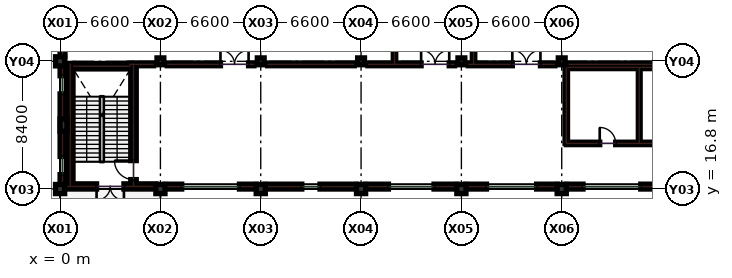
"""IFC4 building model, lengths in metres.
Left out: names, types, materials, properties, quantities, classifications, styles, units other than length and angle.
Written with IfcOpenShell. Run it as: python <this file> out.ifc"""

import sys

from ifc_helpers import new_model, si_unit, direction, frame, frame_2d, origin, origin_2d, place, context, subcontext, project, spatial, rectangle, extrude, element, fill, save


model = new_model("IFC4")
c1 = context("Model", 3, precision=1e-05, world=origin(), true_north=direction((0.0, 1.0)))
c2 = subcontext(c1, "Body", "Model", "MODEL_VIEW")
j1 = project(units=[si_unit("LENGTHUNIT", "METRE"), si_unit("PLANEANGLEUNIT", "RADIAN")], contexts=[c1])
p1 = place(None, origin())
s1 = spatial("IfcSite", under=j1, at=p1, CompositionType="ELEMENT")
p2 = place(p1, origin())
s2 = spatial("IfcBuilding", under=s1, at=p2, CompositionType="ELEMENT")
p3 = place(p2, origin())
s3 = spatial("IfcBuildingStorey", under=s2, at=p3, CompositionType="ELEMENT", Elevation=0.0)
for number, where, z_axis, x_axis in (
    (1, (0.0, 16.8, 0.0), (0.0, 0.0, 1.0), (1.0, 0.0, 0.0)),
    (2, (0.0, 25.2, 0.0), (0.0, 0.0, 1.0), (1.0, 0.0, 0.0)),
    (3, (6.6, 16.8, 0.0), (0.0, 0.0, 1.0), (1.0, 0.0, 0.0)),
):
    element("IfcColumn", number, at=place(p3, frame(where, z_axis=z_axis, x_axis=x_axis)), inside=s3, PredefinedType="COLUMN", context=c2, shape_type="SweptSolid", body=[
        extrude(rectangle(XDim=0.6, YDim=0.6, at=origin_2d()), origin(), (0.0, 0.0, 1.0), 5.4),
    ])
p4 = place(p3, frame((6.6, 25.2, 0.0), z_axis=(0.0, 0.0, 1.0), x_axis=(1.0, 0.0, 0.0)))
e4 = element("IfcColumn", 4, at=p4, inside=s3, PredefinedType="COLUMN", context=c2, shape_type="SweptSolid", body=[
    extrude(rectangle(XDim=0.45, YDim=0.45, at=origin_2d()), origin(), (0.0, 0.0, 1.0), 5.4),
])
p5 = place(p3, frame((13.2, 16.8, 0.0), z_axis=(0.0, 0.0, 1.0), x_axis=(1.0, 0.0, 0.0)))
e5 = element("IfcColumn", 5, at=p5, inside=s3, PredefinedType="COLUMN", context=c2, shape_type="SweptSolid", body=[
    extrude(rectangle(XDim=0.6, YDim=0.6, at=origin_2d()), origin(), (0.0, 0.0, 1.0), 5.4),
])
p6 = place(p3, frame((13.2, 25.2, 0.0), z_axis=(0.0, 0.0, 1.0), x_axis=(1.0, 0.0, 0.0)))
e6 = element("IfcColumn", 6, at=p6, inside=s3, PredefinedType="COLUMN", context=c2, shape_type="SweptSolid", body=[
    extrude(rectangle(XDim=0.45, YDim=0.45, at=origin_2d()), origin(), (0.0, 0.0, 1.0), 5.4),
])
p7 = place(p3, frame((19.8, 16.8, 0.0), z_axis=(0.0, 0.0, 1.0), x_axis=(1.0, 0.0, 0.0)))
e7 = element("IfcColumn", 7, at=p7, inside=s3, PredefinedType="COLUMN", context=c2, shape_type="SweptSolid", body=[
    extrude(rectangle(XDim=0.6, YDim=0.6, at=origin_2d()), origin(), (0.0, 0.0, 1.0), 5.4),
])
p8 = place(p3, frame((19.8, 25.2, 0.0), z_axis=(0.0, 0.0, 1.0), x_axis=(1.0, 0.0, 0.0)))
e8 = element("IfcColumn", 8, at=p8, inside=s3, PredefinedType="COLUMN", context=c2, shape_type="SweptSolid", body=[
    extrude(rectangle(XDim=0.45, YDim=0.45, at=origin_2d()), origin(), (0.0, 0.0, 1.0), 5.4),
])
p9 = place(p3, frame((26.4, 16.8, 0.0), z_axis=(0.0, 0.0, 1.0), x_axis=(1.0, 0.0, 0.0)))
e9 = element("IfcColumn", 9, at=p9, inside=s3, PredefinedType="COLUMN", context=c2, shape_type="SweptSolid", body=[
    extrude(rectangle(XDim=0.6, YDim=0.6, at=origin_2d()), origin(), (0.0, 0.0, 1.0), 5.4),
])
p10 = place(p3, frame((26.4, 25.2, 0.0), z_axis=(0.0, 0.0, 1.0), x_axis=(1.0, 0.0, 0.0)))
e10 = element("IfcColumn", 10, at=p10, inside=s3, PredefinedType="COLUMN", context=c2, shape_type="SweptSolid", body=[
    extrude(rectangle(XDim=0.45, YDim=0.45, at=origin_2d()), origin(), (0.0, 0.0, 1.0), 5.4),
])
p11 = place(p3, frame((33.0, 16.8, 0.0), z_axis=(0.0, 0.0, 1.0), x_axis=(1.0, 0.0, 0.0)))
e11 = element("IfcColumn", 11, at=p11, inside=s3, PredefinedType="COLUMN", context=c2, shape_type="SweptSolid", body=[
    extrude(rectangle(XDim=0.6, YDim=0.6, at=origin_2d()), origin(), (0.0, 0.0, 1.0), 5.4),
])
p12 = place(p3, frame((33.0, 25.2, 0.0), z_axis=(0.0, 0.0, 1.0), x_axis=(1.0, 0.0, 0.0)))
e12 = element("IfcColumn", 12, at=p12, inside=s3, PredefinedType="COLUMN", context=c2, shape_type="SweptSolid", body=[
    extrude(rectangle(XDim=0.45, YDim=0.45, at=origin_2d()), origin(), (0.0, 0.0, 1.0), 5.4),
])
p13 = place(p3, frame((0.225, 21.0, 0.0), z_axis=(0.0, 0.0, 1.0), x_axis=(1.0, 0.0, 0.0)))
e13 = element("IfcColumn", 13, at=p13, inside=s3, PredefinedType="PILASTER", context=c2, shape_type="SweptSolid", body=[
    extrude(rectangle(XDim=0.45, YDim=0.8, at=origin_2d()), origin(), (0.0, 0.0, 1.0), 5.4),
])
p14 = place(p3, frame((33.3, 19.8, 0.0), z_axis=(0.0, 0.0, 1.0), x_axis=(1.0, 0.0, 0.0)))
e14 = element("IfcWall", 14, at=p14, inside=s3, PredefinedType="PARTITIONING", context=c2, shape_type="SweptSolid", body=[
    extrude(rectangle(XDim=12.65, YDim=0.16, at=frame_2d((6.325, 0.0))), origin(), (0.0, 0.0, 1.0), 4.25),
])
p15 = place(p14, frame((2.2, 0.0, 0.0)))
e15 = element("IfcOpeningElement", 15, at=p15, cuts=e14, PredefinedType="OPENING", context=c2, shape_type="SweptSolid", body=[
    extrude(rectangle(XDim=1.05, YDim=2.15, at=frame_2d((0.525, 1.075))), frame((0.0, 0.09, 0.0), z_axis=(0.0, -1.0, 0.0), x_axis=(1.0, 0.0, 0.0)), (0.0, 0.0, 1.0), 0.18),
])
p16 = place(p14, frame((7.0, 0.0, 0.0)))
e16 = element("IfcOpeningElement", 16, at=p16, cuts=e14, PredefinedType="OPENING", context=c2, shape_type="SweptSolid", body=[
    extrude(rectangle(XDim=1.05, YDim=2.15, at=frame_2d((0.525, 1.075))), frame((0.0, 0.09, 0.0), z_axis=(0.0, -1.0, 0.0), x_axis=(1.0, 0.0, 0.0)), (0.0, 0.0, 1.0), 0.18),
])
p17 = place(p14, frame((11.1, 0.0, 0.0)))
e17 = element("IfcOpeningElement", 17, at=p17, cuts=e14, PredefinedType="OPENING", context=c2, shape_type="SweptSolid", body=[
    extrude(rectangle(XDim=1.05, YDim=2.15, at=frame_2d((0.525, 1.075))), frame((0.0, 0.09, 0.0), z_axis=(0.0, -1.0, 0.0), x_axis=(1.0, 0.0, 0.0)), (0.0, 0.0, 1.0), 0.18),
])
p18 = place(p3, frame((33.3, 24.8, 0.0), z_axis=(0.0, 0.0, 1.0), x_axis=(1.0, 0.0, 0.0)))
e18 = element("IfcWall", 18, at=p18, inside=s3, PredefinedType="PARTITIONING", context=c2, shape_type="SweptSolid", body=[
    extrude(rectangle(XDim=5.85, YDim=0.16, at=frame_2d((2.925, 0.0))), origin(), (0.0, 0.0, 1.0), 4.25),
])
p19 = place(p3, frame((33.3, 19.8, 0.0), z_axis=(0.0, 0.0, 1.0), x_axis=(0.0, 1.0, 0.0)))
e19 = element("IfcWall", 19, at=p19, inside=s3, PredefinedType="PARTITIONING", context=c2, shape_type="SweptSolid", body=[
    extrude(rectangle(XDim=5.0, YDim=0.16, at=frame_2d((2.5, 0.0))), origin(), (0.0, 0.0, 1.0), 4.25),
])
p20 = place(p3, frame((38.1, 19.8, 0.0), z_axis=(0.0, 0.0, 1.0), x_axis=(0.0, 1.0, 0.0)))
e20 = element("IfcWall", 20, at=p20, inside=s3, PredefinedType="PARTITIONING", context=c2, shape_type="SweptSolid", body=[
    extrude(rectangle(XDim=5.0, YDim=0.12, at=frame_2d((2.5, 0.0))), origin(), (0.0, 0.0, 1.0), 4.25),
])
p21 = place(p3, frame((4.55, 25.0, 0.0), z_axis=(0.0, 0.0, 1.0), x_axis=(1.0, 0.0, 0.0)))
e21 = element("IfcWall", 21, at=p21, inside=s3, PredefinedType="SOLIDWALL", context=c2, shape_type="SweptSolid", body=[
    extrude(rectangle(XDim=1.6, YDim=0.18, at=frame_2d((0.8, 0.0))), origin(), (0.0, 0.0, 1.0), 4.235),
])
p22 = place(p3, frame((7.05, 25.0, 0.0), z_axis=(0.0, 0.0, 1.0), x_axis=(1.0, 0.0, 0.0)))
e22 = element("IfcWall", 22, at=p22, inside=s3, PredefinedType="SOLIDWALL", context=c2, shape_type="SweptSolid", body=[
    extrude(rectangle(XDim=5.7, YDim=0.18, at=frame_2d((2.85, 0.0))), origin(), (0.0, 0.0, 1.0), 4.235),
])
p23 = place(p22, frame((3.5, 0.0, 0.0)))
e23 = element("IfcOpeningElement", 23, at=p23, cuts=e22, PredefinedType="OPENING", context=c2, shape_type="SweptSolid", body=[
    extrude(rectangle(XDim=1.85, YDim=2.25, at=frame_2d((0.925, 1.125))), frame((0.0, 0.1, 0.0), z_axis=(0.0, -1.0, 0.0), x_axis=(1.0, 0.0, 0.0)), (0.0, 0.0, 1.0), 0.2),
])
p24 = place(p3, frame((13.65, 25.0, 0.0), z_axis=(0.0, 0.0, 1.0), x_axis=(1.0, 0.0, 0.0)))
e24 = element("IfcWall", 24, at=p24, inside=s3, PredefinedType="SOLIDWALL", context=c2, shape_type="SweptSolid", body=[
    extrude(rectangle(XDim=5.7, YDim=0.18, at=frame_2d((2.85, 0.0))), origin(), (0.0, 0.0, 1.0), 4.235),
])
p25 = place(p3, frame((20.25, 25.0, 0.0), z_axis=(0.0, 0.0, 1.0), x_axis=(1.0, 0.0, 0.0)))
e25 = element("IfcWall", 25, at=p25, inside=s3, PredefinedType="SOLIDWALL", context=c2, shape_type="SweptSolid", body=[
    extrude(rectangle(XDim=5.7, YDim=0.18, at=frame_2d((2.85, 0.0))), origin(), (0.0, 0.0, 1.0), 4.235),
])
p26 = place(p25, frame((3.5, 0.0, 0.0)))
e26 = element("IfcOpeningElement", 26, at=p26, cuts=e25, PredefinedType="OPENING", context=c2, shape_type="SweptSolid", body=[
    extrude(rectangle(XDim=1.85, YDim=2.25, at=frame_2d((0.925, 1.125))), frame((0.0, 0.1, 0.0), z_axis=(0.0, -1.0, 0.0), x_axis=(1.0, 0.0, 0.0)), (0.0, 0.0, 1.0), 0.2),
])
p27 = place(p3, frame((26.85, 25.0, 0.0), z_axis=(0.0, 0.0, 1.0), x_axis=(1.0, 0.0, 0.0)))
e27 = element("IfcWall", 27, at=p27, inside=s3, PredefinedType="SOLIDWALL", context=c2, shape_type="SweptSolid", body=[
    extrude(rectangle(XDim=5.7, YDim=0.18, at=frame_2d((2.85, 0.0))), origin(), (0.0, 0.0, 1.0), 4.235),
])
p28 = place(p27, frame((2.9, 0.0, 0.0)))
e28 = element("IfcOpeningElement", 28, at=p28, cuts=e27, PredefinedType="OPENING", context=c2, shape_type="SweptSolid", body=[
    extrude(rectangle(XDim=1.85, YDim=2.25, at=frame_2d((0.925, 1.125))), frame((0.0, 0.1, 0.0), z_axis=(0.0, -1.0, 0.0), x_axis=(1.0, 0.0, 0.0)), (0.0, 0.0, 1.0), 0.2),
])
p29 = place(p3, frame((33.45, 25.0, 0.0), z_axis=(0.0, 0.0, 1.0), x_axis=(1.0, 0.0, 0.0)))
e29 = element("IfcWall", 29, at=p29, inside=s3, PredefinedType="SOLIDWALL", context=c2, shape_type="SweptSolid", body=[
    extrude(rectangle(XDim=5.7, YDim=0.18, at=frame_2d((2.85, 0.0))), origin(), (0.0, 0.0, 1.0), 4.235),
])
for number, where, z_axis, x_axis in (
    (30, (22.0, 25.0, 0.0), (0.0, 0.0, 1.0), (0.0, 1.0, 0.0)),
    (31, (27.2, 25.0, 0.0), (0.0, 0.0, 1.0), (0.0, 1.0, 0.0)),
):
    element("IfcWall", number, at=place(p3, frame(where, z_axis=z_axis, x_axis=x_axis)), inside=s3, PredefinedType="PARTITIONING", context=c2, shape_type="SweptSolid", body=[
        extrude(rectangle(XDim=25.2, YDim=0.16, at=frame_2d((12.6, 0.0))), origin(), (0.0, 0.0, 1.0), 4.25),
    ])
p30 = place(p3, frame((0.295, 16.97, 0.0), z_axis=(0.0, 0.0, 1.0), x_axis=(1.0, 0.0, 0.0)))
e32 = element("IfcWall", 32, at=p30, inside=s3, PredefinedType="SHEAR", context=c2, shape_type="SweptSolid", body=[
    extrude(rectangle(XDim=6.01, YDim=0.34, at=frame_2d((3.005, 0.0))), origin(), (0.0, 0.0, 1.0), 5.1),
])
p31 = place(p30, frame((2.105, 0.0, 0.0)))
e33 = element("IfcOpeningElement", 33, at=p31, cuts=e32, PredefinedType="OPENING", context=c2, shape_type="SweptSolid", body=[
    extrude(rectangle(XDim=1.8, YDim=2.2, at=frame_2d((0.9, 1.1))), frame((0.0, 0.18, 0.0), z_axis=(0.0, -1.0, 0.0), x_axis=(1.0, 0.0, 0.0)), (0.0, 0.0, 1.0), 0.36),
])
p32 = place(p3, frame((0.16, 24.905, 0.0), z_axis=(0.0, 0.0, 1.0), x_axis=(0.0, -1.0, 0.0)))
e34 = element("IfcWall", 34, at=p32, inside=s3, PredefinedType="SOLIDWALL", context=c2, shape_type="SweptSolid", body=[
    extrude(rectangle(XDim=7.81, YDim=0.32, at=frame_2d((3.905, 0.0))), origin(), (0.0, 0.0, 1.0), 4.335),
])
p33 = place(p32, frame((0.65, 0.0, 0.95)))
e35 = element("IfcOpeningElement", 35, at=p33, cuts=e34, PredefinedType="OPENING", context=c2, shape_type="SweptSolid", body=[
    extrude(rectangle(XDim=1.2, YDim=1.5, at=frame_2d((0.6, 0.75))), frame((0.0, 0.17, 0.0), z_axis=(0.0, -1.0, 0.0), x_axis=(1.0, 0.0, 0.0)), (0.0, 0.0, 1.0), 0.34),
])
p34 = place(p32, frame((5.96, 0.0, 0.95)))
e36 = element("IfcOpeningElement", 36, at=p34, cuts=e34, PredefinedType="OPENING", context=c2, shape_type="SweptSolid", body=[
    extrude(rectangle(XDim=1.2, YDim=1.5, at=frame_2d((0.6, 0.75))), frame((0.0, 0.17, 0.0), z_axis=(0.0, -1.0, 0.0), x_axis=(1.0, 0.0, 0.0)), (0.0, 0.0, 1.0), 0.34),
])
p35 = place(p3, frame((0.16, 33.305, 0.0), z_axis=(0.0, 0.0, 1.0), x_axis=(0.0, -1.0, 0.0)))
e37 = element("IfcWall", 37, at=p35, inside=s3, PredefinedType="SOLIDWALL", context=c2, shape_type="SweptSolid", body=[
    extrude(rectangle(XDim=7.81, YDim=0.32, at=frame_2d((3.905, 0.0))), origin(), (0.0, 0.0, 1.0), 4.335),
])
p36 = place(p35, frame((3.005, 0.0, 0.0)))
e38 = element("IfcOpeningElement", 38, at=p36, cuts=e37, PredefinedType="OPENING", context=c2, shape_type="SweptSolid", body=[
    extrude(rectangle(XDim=1.8, YDim=2.2, at=frame_2d((0.9, 1.1))), frame((0.0, 0.17, 0.0), z_axis=(0.0, -1.0, 0.0), x_axis=(1.0, 0.0, 0.0)), (0.0, 0.0, 1.0), 0.34),
])
p37 = place(p3, frame((6.895, 16.96, 0.0), z_axis=(0.0, 0.0, 1.0), x_axis=(1.0, 0.0, 0.0)))
e39 = element("IfcWall", 39, at=p37, inside=s3, PredefinedType="SOLIDWALL", context=c2, shape_type="SweptSolid", body=[
    extrude(rectangle(XDim=6.01, YDim=0.32, at=frame_2d((3.005, 0.0))), origin(), (0.0, 0.0, 1.0), 4.385),
])
p38 = place(p37, frame((1.105, 0.0, 1.35)))
e40 = element("IfcOpeningElement", 40, at=p38, cuts=e39, PredefinedType="OPENING", context=c2, shape_type="SweptSolid", body=[
    extrude(rectangle(XDim=3.8, YDim=1.15, at=frame_2d((1.9, 0.575))), frame((0.0, 0.17, 0.0), z_axis=(0.0, -1.0, 0.0), x_axis=(1.0, 0.0, 0.0)), (0.0, 0.0, 1.0), 0.34),
])
p39 = place(p3, frame((13.495, 16.96, 0.0), z_axis=(0.0, 0.0, 1.0), x_axis=(1.0, 0.0, 0.0)))
e41 = element("IfcWall", 41, at=p39, inside=s3, PredefinedType="SOLIDWALL", context=c2, shape_type="SweptSolid", body=[
    extrude(rectangle(XDim=6.01, YDim=0.32, at=frame_2d((3.005, 0.0))), origin(), (0.0, 0.0, 1.0), 4.385),
])
p40 = place(p39, frame((2.405, 0.0, 0.95)))
e42 = element("IfcOpeningElement", 42, at=p40, cuts=e41, PredefinedType="OPENING", context=c2, shape_type="SweptSolid", body=[
    extrude(rectangle(XDim=1.2, YDim=1.5, at=frame_2d((0.6, 0.75))), frame((0.0, 0.17, 0.0), z_axis=(0.0, -1.0, 0.0), x_axis=(1.0, 0.0, 0.0)), (0.0, 0.0, 1.0), 0.34),
])
p41 = place(p3, frame((20.095, 16.96, 0.0), z_axis=(0.0, 0.0, 1.0), x_axis=(1.0, 0.0, 0.0)))
e43 = element("IfcWall", 43, at=p41, inside=s3, PredefinedType="SOLIDWALL", context=c2, shape_type="SweptSolid", body=[
    extrude(rectangle(XDim=6.01, YDim=0.32, at=frame_2d((3.005, 0.0))), origin(), (0.0, 0.0, 1.0), 4.385),
])
p42 = place(p41, frame((1.505, 0.0, 0.95)))
e44 = element("IfcOpeningElement", 44, at=p42, cuts=e43, PredefinedType="OPENING", context=c2, shape_type="SweptSolid", body=[
    extrude(rectangle(XDim=3.0, YDim=1.8, at=frame_2d((1.5, 0.9))), frame((0.0, 0.17, 0.0), z_axis=(0.0, -1.0, 0.0), x_axis=(1.0, 0.0, 0.0)), (0.0, 0.0, 1.0), 0.34),
])
p43 = place(p3, frame((26.695, 16.96, 0.0), z_axis=(0.0, 0.0, 1.0), x_axis=(1.0, 0.0, 0.0)))
e45 = element("IfcWall", 45, at=p43, inside=s3, PredefinedType="SOLIDWALL", context=c2, shape_type="SweptSolid", body=[
    extrude(rectangle(XDim=6.01, YDim=0.32, at=frame_2d((3.005, 0.0))), origin(), (0.0, 0.0, 1.0), 4.385),
])
p44 = place(p43, frame((1.355, 0.0, 1.35)))
e46 = element("IfcOpeningElement", 46, at=p44, cuts=e45, PredefinedType="OPENING", context=c2, shape_type="SweptSolid", body=[
    extrude(rectangle(XDim=3.3, YDim=1.05, at=frame_2d((1.65, 0.525))), frame((0.0, 0.17, 0.0), z_axis=(0.0, -1.0, 0.0), x_axis=(1.0, 0.0, 0.0)), (0.0, 0.0, 1.0), 0.34),
])
p45 = place(p3, frame((33.295, 16.96, 0.0), z_axis=(0.0, 0.0, 1.0), x_axis=(1.0, 0.0, 0.0)))
e47 = element("IfcWall", 47, at=p45, inside=s3, PredefinedType="SOLIDWALL", context=c2, shape_type="SweptSolid", body=[
    extrude(rectangle(XDim=6.01, YDim=0.32, at=frame_2d((3.005, 0.0))), origin(), (0.0, 0.0, 1.0), 4.385),
])
p46 = place(p45, frame((1.105, 0.0, 1.35)))
e48 = element("IfcOpeningElement", 48, at=p46, cuts=e47, PredefinedType="OPENING", context=c2, shape_type="SweptSolid", body=[
    extrude(rectangle(XDim=3.8, YDim=1.15, at=frame_2d((1.9, 0.575))), frame((0.0, 0.17, 0.0), z_axis=(0.0, -1.0, 0.0), x_axis=(1.0, 0.0, 0.0)), (0.0, 0.0, 1.0), 0.34),
])
p47 = place(p3, frame((0.67, 16.97, 0.0), z_axis=(0.0, 0.0, 1.0), x_axis=(0.0, 1.0, 0.0)))
e49 = element("IfcWall", 49, at=p47, inside=s3, PredefinedType="SHEAR", context=c2, shape_type="SweptSolid", body=[
    extrude(rectangle(XDim=8.09, YDim=0.36, at=frame_2d((4.045, 0.0))), origin(), (0.0, 0.0, 1.0), 5.1),
])
p48 = place(p3, frame((4.83, 16.97, 0.0), z_axis=(0.0, 0.0, 1.0), x_axis=(0.0, 1.0, 0.0)))
e50 = element("IfcWall", 50, at=p48, inside=s3, PredefinedType="SHEAR", context=c2, shape_type="SweptSolid", body=[
    extrude(rectangle(XDim=8.09, YDim=0.36, at=frame_2d((4.045, 0.0))), origin(), (0.0, 0.0, 1.0), 5.1),
])
p49 = place(p48, frame((0.45, 0.0, 0.0)))
e51 = element("IfcOpeningElement", 51, at=p49, cuts=e50, PredefinedType="OPENING", context=c2, shape_type="SweptSolid", body=[
    extrude(rectangle(XDim=1.25, YDim=2.15, at=frame_2d((0.625, 1.075))), frame((0.0, 0.19, 0.0), z_axis=(0.0, -1.0, 0.0), x_axis=(1.0, 0.0, 0.0)), (0.0, 0.0, 1.0), 0.38),
])
p50 = place(p3, frame((0.85, 24.88, 0.0), z_axis=(0.0, 0.0, 1.0), x_axis=(1.0, 0.0, 0.0)))
e52 = element("IfcWall", 52, at=p50, inside=s3, PredefinedType="SHEAR", context=c2, shape_type="SweptSolid", body=[
    extrude(rectangle(XDim=3.8, YDim=0.36, at=frame_2d((1.9, 0.0))), origin(), (0.0, 0.0, 1.0), 5.1),
])
p51 = place(p15, origin())
e53 = element("IfcDoor", 53, at=p51, inside=s3, OperationType="SINGLE_SWING_LEFT", PredefinedType="DOOR", context=c2, shape_type="SweptSolid", body=[
    extrude(rectangle(XDim=1.05, YDim=2.15, at=frame_2d((0.525, 1.075))), frame((0.0, 0.025, 0.0), z_axis=(0.0, -1.0, 0.0), x_axis=(1.0, 0.0, 0.0)), (0.0, 0.0, 1.0), 0.05),
])
fill(e15, e53)
p52 = place(p23, origin())
e54 = element("IfcDoor", 54, at=p52, inside=s3, OperationType="DOUBLE_DOOR_SINGLE_SWING", PredefinedType="DOOR", context=c2, shape_type="SweptSolid", body=[
    extrude(rectangle(XDim=1.85, YDim=2.25, at=frame_2d((0.925, 1.125))), frame((0.0, 0.025, 0.0), z_axis=(0.0, -1.0, 0.0), x_axis=(1.0, 0.0, 0.0)), (0.0, 0.0, 1.0), 0.05),
])
fill(e23, e54)
p53 = place(p26, origin())
e55 = element("IfcDoor", 55, at=p53, inside=s3, OperationType="DOUBLE_DOOR_SINGLE_SWING", PredefinedType="DOOR", context=c2, shape_type="SweptSolid", body=[
    extrude(rectangle(XDim=1.85, YDim=2.25, at=frame_2d((0.925, 1.125))), frame((0.0, 0.025, 0.0), z_axis=(0.0, -1.0, 0.0), x_axis=(1.0, 0.0, 0.0)), (0.0, 0.0, 1.0), 0.05),
])
fill(e26, e55)
p54 = place(p28, origin())
e56 = element("IfcDoor", 56, at=p54, inside=s3, OperationType="DOUBLE_DOOR_SINGLE_SWING", PredefinedType="DOOR", context=c2, shape_type="SweptSolid", body=[
    extrude(rectangle(XDim=1.85, YDim=2.25, at=frame_2d((0.925, 1.125))), frame((0.0, 0.025, 0.0), z_axis=(0.0, -1.0, 0.0), x_axis=(1.0, 0.0, 0.0)), (0.0, 0.0, 1.0), 0.05),
])
fill(e28, e56)
p55 = place(p31, frame((1.8, 0.0, 0.0), z_axis=(0.0, 0.0, 1.0), x_axis=(-1.0, 0.0, 0.0)))
e57 = element("IfcDoor", 57, at=p55, inside=s3, OperationType="DOUBLE_DOOR_SINGLE_SWING", PredefinedType="DOOR", context=c2, shape_type="SweptSolid", body=[
    extrude(rectangle(XDim=1.8, YDim=2.2, at=frame_2d((0.9, 1.1))), frame((0.0, 0.025, 0.0), z_axis=(0.0, -1.0, 0.0), x_axis=(1.0, 0.0, 0.0)), (0.0, 0.0, 1.0), 0.05),
])
fill(e33, e57)
p56 = place(p33, origin())
e58 = element("IfcWindow", 58, at=p56, inside=s3, PartitioningType="SINGLE_PANEL", PredefinedType="WINDOW", context=c2, shape_type="SweptSolid", body=[
    extrude(rectangle(XDim=1.2, YDim=1.5, at=frame_2d((0.6, 0.75))), frame((0.0, 0.03, 0.0), z_axis=(0.0, -1.0, 0.0), x_axis=(1.0, 0.0, 0.0)), (0.0, 0.0, 1.0), 0.06),
])
fill(e35, e58)
p57 = place(p34, origin())
e59 = element("IfcWindow", 59, at=p57, inside=s3, PartitioningType="SINGLE_PANEL", PredefinedType="WINDOW", context=c2, shape_type="SweptSolid", body=[
    extrude(rectangle(XDim=1.2, YDim=1.5, at=frame_2d((0.6, 0.75))), frame((0.0, 0.03, 0.0), z_axis=(0.0, -1.0, 0.0), x_axis=(1.0, 0.0, 0.0)), (0.0, 0.0, 1.0), 0.06),
])
fill(e36, e59)
p58 = place(p38, origin())
e60 = element("IfcWindow", 60, at=p58, inside=s3, PartitioningType="SINGLE_PANEL", PredefinedType="WINDOW", context=c2, shape_type="SweptSolid", body=[
    extrude(rectangle(XDim=3.8, YDim=1.15, at=frame_2d((1.9, 0.575))), frame((0.0, 0.03, 0.0), z_axis=(0.0, -1.0, 0.0), x_axis=(1.0, 0.0, 0.0)), (0.0, 0.0, 1.0), 0.06),
])
fill(e40, e60)
p59 = place(p40, origin())
e61 = element("IfcWindow", 61, at=p59, inside=s3, PartitioningType="SINGLE_PANEL", PredefinedType="WINDOW", context=c2, shape_type="SweptSolid", body=[
    extrude(rectangle(XDim=1.2, YDim=1.5, at=frame_2d((0.6, 0.75))), frame((0.0, 0.03, 0.0), z_axis=(0.0, -1.0, 0.0), x_axis=(1.0, 0.0, 0.0)), (0.0, 0.0, 1.0), 0.06),
])
fill(e42, e61)
p60 = place(p42, origin())
e62 = element("IfcWindow", 62, at=p60, inside=s3, PartitioningType="SINGLE_PANEL", PredefinedType="WINDOW", context=c2, shape_type="SweptSolid", body=[
    extrude(rectangle(XDim=3.0, YDim=1.8, at=frame_2d((1.5, 0.9))), frame((0.0, 0.03, 0.0), z_axis=(0.0, -1.0, 0.0), x_axis=(1.0, 0.0, 0.0)), (0.0, 0.0, 1.0), 0.06),
])
fill(e44, e62)
p61 = place(p44, origin())
e63 = element("IfcWindow", 63, at=p61, inside=s3, PartitioningType="SINGLE_PANEL", PredefinedType="WINDOW", context=c2, shape_type="SweptSolid", body=[
    extrude(rectangle(XDim=3.3, YDim=1.05, at=frame_2d((1.65, 0.525))), frame((0.0, 0.03, 0.0), z_axis=(0.0, -1.0, 0.0), x_axis=(1.0, 0.0, 0.0)), (0.0, 0.0, 1.0), 0.06),
])
fill(e46, e63)
p62 = place(p46, origin())
e64 = element("IfcWindow", 64, at=p62, inside=s3, PartitioningType="SINGLE_PANEL", PredefinedType="WINDOW", context=c2, shape_type="SweptSolid", body=[
    extrude(rectangle(XDim=3.8, YDim=1.15, at=frame_2d((1.9, 0.575))), frame((0.0, 0.03, 0.0), z_axis=(0.0, -1.0, 0.0), x_axis=(1.0, 0.0, 0.0)), (0.0, 0.0, 1.0), 0.06),
])
fill(e48, e64)
p63 = place(p49, origin())
e65 = element("IfcDoor", 65, at=p63, inside=s3, OperationType="SINGLE_SWING_RIGHT", PredefinedType="DOOR", context=c2, shape_type="SweptSolid", body=[
    extrude(rectangle(XDim=1.25, YDim=2.15, at=frame_2d((0.625, 1.075))), frame((0.0, 0.025, 0.0), z_axis=(0.0, -1.0, 0.0), x_axis=(1.0, 0.0, 0.0)), (0.0, 0.0, 1.0), 0.05),
])
fill(e51, e65)
save(model, sys.argv[1])
